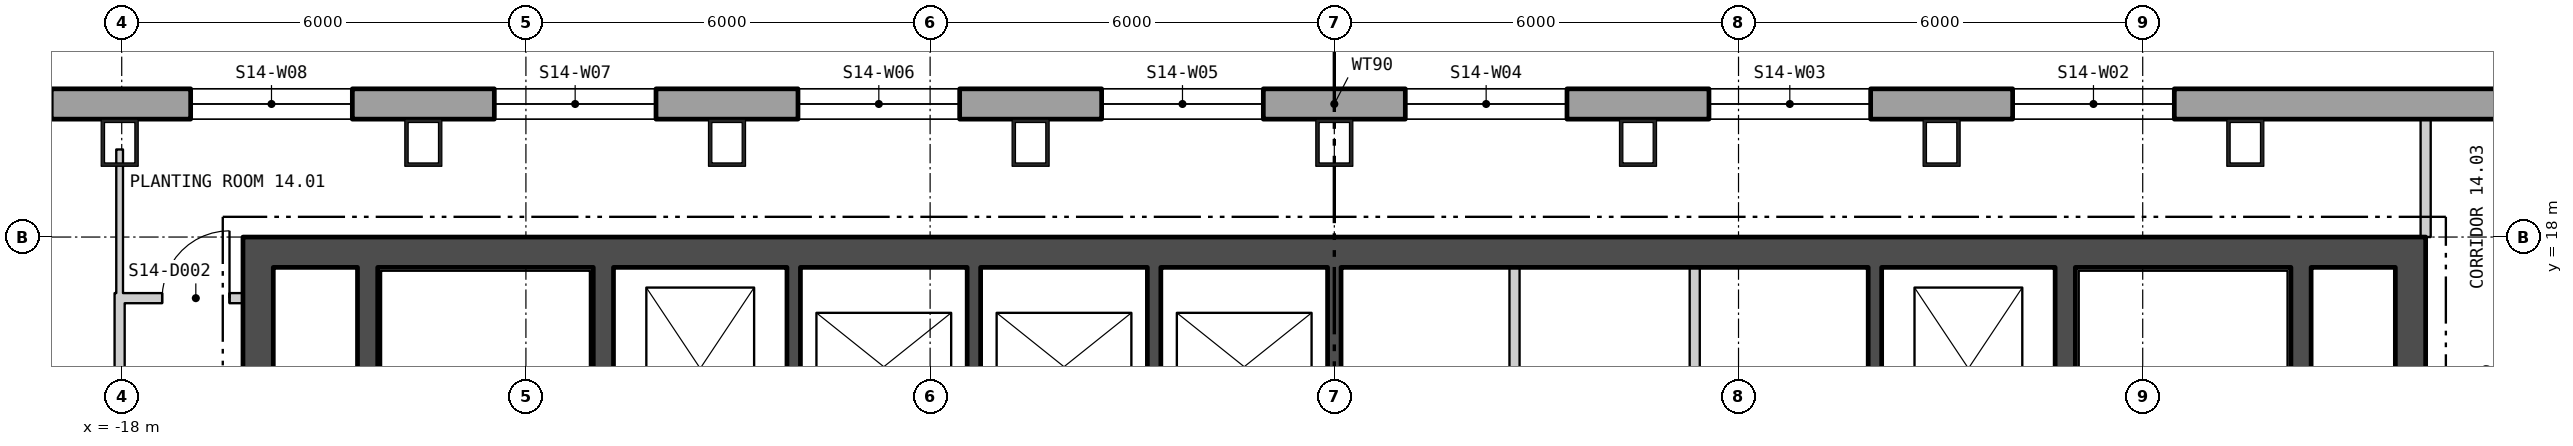
"""IFC4 building model, lengths in metres.
Left out: names, types, materials, properties, quantities, classifications, styles, units other than length and angle.
Written with IfcOpenShell. Run it as: python <this file> out.ifc"""

import sys

from ifc_helpers import new_model, si_unit, direction, frame, frame_2d, origin, origin_2d, place, context, subcontext, project, spatial, polyline, rectangle, hollow_rectangle, outline, extrude, element, fill, save


model = new_model("IFC4")
c1 = context("Model", 3, precision=1e-05, world=origin(), true_north=direction((0.0, 1.0)))
c2 = subcontext(c1, "Body", "Model", "MODEL_VIEW")
j1 = project(units=[si_unit("LENGTHUNIT", "METRE"), si_unit("PLANEANGLEUNIT", "RADIAN")], contexts=[c1])
p1 = place(None, origin())
s1 = spatial("IfcSite", under=j1, at=p1, CompositionType="ELEMENT")
p2 = place(p1, origin())
s2 = spatial("IfcBuilding", under=s1, at=p2, CompositionType="ELEMENT")
p3 = place(p2, frame((0.0, 0.0, 192.6)))
s3 = spatial("IfcBuildingStorey", under=s2, at=p3, CompositionType="ELEMENT", Elevation=192.6)
for number, where, z_axis, x_axis in (
    (1, (13.523, 19.4, 0.0), (0.0, 0.0, 1.0), (-1.0, 0.0, 0.0)),
    (2, (9.015, 19.4, 0.0), (0.0, 0.0, 1.0), (-1.0, 0.0, 0.0)),
    (3, (4.508, 19.4, 0.0), (0.0, 0.0, 1.0), (-1.0, 0.0, 0.0)),
    (4, (0.0, 19.4, 0.0), (0.0, 0.0, 1.0), (-1.0, 0.0, 0.0)),
    (5, (-4.508, 19.4, 0.0), (0.0, 0.0, 1.0), (-1.0, 0.0, 0.0)),
    (6, (-9.015, 19.4, 0.0), (0.0, 0.0, 1.0), (-1.0, 0.0, 0.0)),
    (7, (-13.523, 19.4, 0.0), (0.0, 0.0, 1.0), (-1.0, 0.0, 0.0)),
    (8, (-18.03, 19.4, 0.0), (0.0, 0.0, 1.0), (-1.0, 0.0, 0.0)),
):
    element("IfcColumn", number, at=place(p3, frame(where, z_axis=z_axis, x_axis=x_axis)), inside=s3, PredefinedType="COLUMN", context=c2, shape_type="SweptSolid", body=[
        extrude(hollow_rectangle(XDim=0.55, YDim=0.7, WallThickness=0.05, at=origin_2d()), origin(), (0.0, 0.0, 1.0), 3.9),
    ])
p4 = place(p3, frame((22.87, 19.975, -0.4), z_axis=(0.0, 0.0, 1.0), x_axis=(-1.0, 0.0, 0.0)))
e9 = element("IfcWall", 9, at=p4, inside=s3, PredefinedType="SOLIDWALL", context=c2, shape_type="SweptSolid", body=[
    extrude(outline(polyline([(-0.13, -0.225), (45.87, -0.225), (45.61, 0.225), (0.13, 0.225), (-0.13, -0.225)])), origin(), (0.0, 0.0, 1.0), 3.9),
])
p5 = place(p4, frame((1.424, 0.0, 1.3)))
e10 = element("IfcOpeningElement", 10, at=p5, cuts=e9, PredefinedType="OPENING", context=c2, shape_type="SweptSolid", body=[
    extrude(rectangle(XDim=2.4, YDim=2.0, at=frame_2d((1.2, 1.0))), frame((0.0, 0.235, 0.0), z_axis=(0.0, -1.0, 0.0), x_axis=(1.0, 0.0, 0.0)), (0.0, 0.0, 1.0), 0.47),
])
p6 = place(p4, frame((10.401, 0.0, 1.3)))
e11 = element("IfcOpeningElement", 11, at=p6, cuts=e9, PredefinedType="OPENING", context=c2, shape_type="SweptSolid", body=[
    extrude(rectangle(XDim=2.4, YDim=2.0, at=frame_2d((1.2, 1.0))), frame((0.0, 0.235, 0.0), z_axis=(0.0, -1.0, 0.0), x_axis=(1.0, 0.0, 0.0)), (0.0, 0.0, 1.0), 0.47),
])
p7 = place(p4, frame((14.909, 0.0, 1.3)))
e12 = element("IfcOpeningElement", 12, at=p7, cuts=e9, PredefinedType="OPENING", context=c2, shape_type="SweptSolid", body=[
    extrude(rectangle(XDim=2.4, YDim=2.0, at=frame_2d((1.2, 1.0))), frame((0.0, 0.235, 0.0), z_axis=(0.0, -1.0, 0.0), x_axis=(1.0, 0.0, 0.0)), (0.0, 0.0, 1.0), 0.47),
])
p8 = place(p4, frame((19.416, 0.0, 1.3)))
e13 = element("IfcOpeningElement", 13, at=p8, cuts=e9, PredefinedType="OPENING", context=c2, shape_type="SweptSolid", body=[
    extrude(rectangle(XDim=2.4, YDim=2.0, at=frame_2d((1.2, 1.0))), frame((0.0, 0.235, 0.0), z_axis=(0.0, -1.0, 0.0), x_axis=(1.0, 0.0, 0.0)), (0.0, 0.0, 1.0), 0.47),
])
p9 = place(p4, frame((23.924, 0.0, 1.3)))
e14 = element("IfcOpeningElement", 14, at=p9, cuts=e9, PredefinedType="OPENING", context=c2, shape_type="SweptSolid", body=[
    extrude(rectangle(XDim=2.4, YDim=2.0, at=frame_2d((1.2, 1.0))), frame((0.0, 0.235, 0.0), z_axis=(0.0, -1.0, 0.0), x_axis=(1.0, 0.0, 0.0)), (0.0, 0.0, 1.0), 0.47),
])
p10 = place(p4, frame((28.431, 0.0, 1.3)))
e15 = element("IfcOpeningElement", 15, at=p10, cuts=e9, PredefinedType="OPENING", context=c2, shape_type="SweptSolid", body=[
    extrude(rectangle(XDim=2.4, YDim=2.0, at=frame_2d((1.2, 1.0))), frame((0.0, 0.235, 0.0), z_axis=(0.0, -1.0, 0.0), x_axis=(1.0, 0.0, 0.0)), (0.0, 0.0, 1.0), 0.47),
])
p11 = place(p4, frame((32.939, 0.0, 1.3)))
e16 = element("IfcOpeningElement", 16, at=p11, cuts=e9, PredefinedType="OPENING", context=c2, shape_type="SweptSolid", body=[
    extrude(rectangle(XDim=2.4, YDim=2.0, at=frame_2d((1.2, 1.0))), frame((0.0, 0.235, 0.0), z_axis=(0.0, -1.0, 0.0), x_axis=(1.0, 0.0, 0.0)), (0.0, 0.0, 1.0), 0.47),
])
p12 = place(p4, frame((37.447, 0.0, 1.3)))
e17 = element("IfcOpeningElement", 17, at=p12, cuts=e9, PredefinedType="OPENING", context=c2, shape_type="SweptSolid", body=[
    extrude(rectangle(XDim=2.4, YDim=2.0, at=frame_2d((1.2, 1.0))), frame((0.0, 0.235, 0.0), z_axis=(0.0, -1.0, 0.0), x_axis=(1.0, 0.0, 0.0)), (0.0, 0.0, 1.0), 0.47),
])
p13 = place(p4, frame((41.916, 0.0, 1.3)))
e18 = element("IfcOpeningElement", 18, at=p13, cuts=e9, PredefinedType="OPENING", context=c2, shape_type="SweptSolid", body=[
    extrude(rectangle(XDim=2.4, YDim=2.0, at=frame_2d((1.2, 1.0))), frame((0.0, 0.235, 0.0), z_axis=(0.0, -1.0, 0.0), x_axis=(1.0, 0.0, 0.0)), (0.0, 0.0, 1.0), 0.47),
])
p14 = place(p3, frame((-16.2, 17.775, 0.0), z_axis=(0.0, 0.0, 1.0), x_axis=(1.0, 0.0, 0.0)))
e19 = element("IfcWall", 19, at=p14, inside=s3, PredefinedType="SHEAR", context=c2, shape_type="SweptSolid", body=[
    extrude(rectangle(XDim=32.4, YDim=0.45, at=frame_2d((16.2, 0.0))), origin(), (0.0, 0.0, 1.0), 3.7),
])
p15 = place(p3, frame((-15.975, 2.45, 0.0), z_axis=(0.0, 0.0, 1.0), x_axis=(0.0, 1.0, 0.0)))
e20 = element("IfcWall", 20, at=p15, inside=s3, PredefinedType="SHEAR", context=c2, shape_type="SweptSolid", body=[
    extrude(rectangle(XDim=15.1, YDim=0.45, at=frame_2d((7.55, 0.0))), origin(), (0.0, 0.0, 1.0), 3.7),
])
p16 = place(p15, frame((4.4, 0.0, 0.0)))
e21 = element("IfcOpeningElement", 21, at=p16, cuts=e20, PredefinedType="OPENING", context=c2, shape_type="SweptSolid", body=[
    extrude(rectangle(XDim=1.5, YDim=2.1, at=frame_2d((0.75, 1.05))), frame((0.0, 0.235, 0.0), z_axis=(0.0, -1.0, 0.0), x_axis=(1.0, 0.0, 0.0)), (0.0, 0.0, 1.0), 0.47),
])
p17 = place(p15, frame((0.4, 0.0, 0.0)))
e22 = element("IfcOpeningElement", 22, at=p17, cuts=e20, PredefinedType="OPENING", context=c2, shape_type="SweptSolid", body=[
    extrude(rectangle(XDim=1.0, YDim=2.1, at=frame_2d((0.5, 1.05))), frame((0.0, 0.235, 0.0), z_axis=(0.0, -1.0, 0.0), x_axis=(1.0, 0.0, 0.0)), (0.0, 0.0, 1.0), 0.47),
])
p18 = place(p15, frame((2.5, 0.0, 0.0)))
e23 = element("IfcOpeningElement", 23, at=p18, cuts=e20, PredefinedType="OPENING", context=c2, shape_type="SweptSolid", body=[
    extrude(rectangle(XDim=0.9, YDim=2.1, at=frame_2d((0.45, 1.05))), frame((0.0, 0.235, 0.0), z_axis=(0.0, -1.0, 0.0), x_axis=(1.0, 0.0, 0.0)), (0.0, 0.0, 1.0), 0.47),
])
p19 = place(p15, frame((6.544, 0.0, 0.0)))
e24 = element("IfcOpeningElement", 24, at=p19, cuts=e20, PredefinedType="OPENING", context=c2, shape_type="SweptSolid", body=[
    extrude(rectangle(XDim=0.9, YDim=2.1, at=frame_2d((0.45, 1.05))), frame((0.0, 0.235, 0.0), z_axis=(0.0, -1.0, 0.0), x_axis=(1.0, 0.0, 0.0)), (0.0, 0.0, 1.0), 0.47),
])
p20 = place(p15, frame((11.144, 0.0, 0.0)))
e25 = element("IfcOpeningElement", 25, at=p20, cuts=e20, PredefinedType="OPENING", context=c2, shape_type="SweptSolid", body=[
    extrude(rectangle(XDim=0.9, YDim=2.1, at=frame_2d((0.45, 1.05))), frame((0.0, 0.235, 0.0), z_axis=(0.0, -1.0, 0.0), x_axis=(1.0, 0.0, 0.0)), (0.0, 0.0, 1.0), 0.47),
])
p21 = place(p3, frame((15.975, 2.45, 0.0), z_axis=(0.0, 0.0, 1.0), x_axis=(0.0, 1.0, 0.0)))
e26 = element("IfcWall", 26, at=p21, inside=s3, PredefinedType="SHEAR", context=c2, shape_type="SweptSolid", body=[
    extrude(rectangle(XDim=15.1, YDim=0.45, at=frame_2d((7.55, 0.0))), origin(), (0.0, 0.0, 1.0), 3.7),
])
p22 = place(p21, frame((4.4, 0.0, 0.0)))
e27 = element("IfcOpeningElement", 27, at=p22, cuts=e26, PredefinedType="OPENING", context=c2, shape_type="SweptSolid", body=[
    extrude(rectangle(XDim=1.5, YDim=2.1, at=frame_2d((0.75, 1.05))), frame((0.0, 0.235, 0.0), z_axis=(0.0, -1.0, 0.0), x_axis=(1.0, 0.0, 0.0)), (0.0, 0.0, 1.0), 0.47),
])
p23 = place(p21, frame((0.85, 0.0, 0.0)))
e28 = element("IfcOpeningElement", 28, at=p23, cuts=e26, PredefinedType="OPENING", context=c2, shape_type="SweptSolid", body=[
    extrude(rectangle(XDim=0.9, YDim=2.1, at=frame_2d((0.45, 1.05))), frame((0.0, 0.235, 0.0), z_axis=(0.0, -1.0, 0.0), x_axis=(1.0, 0.0, 0.0)), (0.0, 0.0, 1.0), 0.47),
])
p24 = place(p21, frame((3.0, 0.0, 0.0)))
e29 = element("IfcOpeningElement", 29, at=p24, cuts=e26, PredefinedType="OPENING", context=c2, shape_type="SweptSolid", body=[
    extrude(rectangle(XDim=1.0, YDim=2.1, at=frame_2d((0.5, 1.05))), frame((0.0, 0.235, 0.0), z_axis=(0.0, -1.0, 0.0), x_axis=(1.0, 0.0, 0.0)), (0.0, 0.0, 1.0), 0.47),
])
p25 = place(p21, frame((7.239, 0.0, 0.0)))
e30 = element("IfcOpeningElement", 30, at=p25, cuts=e26, PredefinedType="OPENING", context=c2, shape_type="SweptSolid", body=[
    extrude(rectangle(XDim=0.9, YDim=2.1, at=frame_2d((0.45, 1.05))), frame((0.0, 0.235, 0.0), z_axis=(0.0, -1.0, 0.0), x_axis=(1.0, 0.0, 0.0)), (0.0, 0.0, 1.0), 0.47),
])
p26 = place(p21, frame((11.839, 0.0, 0.0)))
e31 = element("IfcOpeningElement", 31, at=p26, cuts=e26, PredefinedType="OPENING", context=c2, shape_type="SweptSolid", body=[
    extrude(rectangle(XDim=0.9, YDim=2.1, at=frame_2d((0.45, 1.05))), frame((0.0, 0.235, 0.0), z_axis=(0.0, -1.0, 0.0), x_axis=(1.0, 0.0, 0.0)), (0.0, 0.0, 1.0), 0.47),
])
p27 = place(p3, frame((-10.85, 2.45, 0.0), z_axis=(0.0, 0.0, 1.0), x_axis=(0.0, 1.0, 0.0)))
e32 = element("IfcWall", 32, at=p27, inside=s3, PredefinedType="SHEAR", context=c2, shape_type="SweptSolid", body=[
    extrude(rectangle(XDim=15.1, YDim=0.3, at=frame_2d((7.55, 0.0))), origin(), (0.0, 0.0, 1.0), 3.7),
])
p28 = place(p27, frame((3.525, 0.0, 0.0)))
e33 = element("IfcOpeningElement", 33, at=p28, cuts=e32, PredefinedType="OPENING", context=c2, shape_type="SweptSolid", body=[
    extrude(rectangle(XDim=1.25, YDim=2.1, at=frame_2d((0.625, 1.05))), frame((0.0, 0.16, 0.0), z_axis=(0.0, -1.0, 0.0), x_axis=(1.0, 0.0, 0.0)), (0.0, 0.0, 1.0), 0.32),
])
p29 = place(p27, frame((1.15, 0.0, 0.0)))
e34 = element("IfcOpeningElement", 34, at=p29, cuts=e32, PredefinedType="OPENING", context=c2, shape_type="SweptSolid", body=[
    extrude(rectangle(XDim=1.0, YDim=2.1, at=frame_2d((0.5, 1.05))), frame((0.0, 0.16, 0.0), z_axis=(0.0, -1.0, 0.0), x_axis=(1.0, 0.0, 0.0)), (0.0, 0.0, 1.0), 0.32),
])
p30 = place(p3, frame((-14.35, 2.45, 0.0), z_axis=(0.0, 0.0, 1.0), x_axis=(0.0, 1.0, 0.0)))
e35 = element("IfcWall", 35, at=p30, inside=s3, PredefinedType="SHEAR", context=c2, shape_type="SweptSolid", body=[
    extrude(rectangle(XDim=15.1, YDim=0.3, at=frame_2d((7.55, 0.0))), origin(), (0.0, 0.0, 1.0), 3.7),
])
p31 = place(p30, frame((4.4, 0.0, 0.0)))
e36 = element("IfcOpeningElement", 36, at=p31, cuts=e35, PredefinedType="OPENING", context=c2, shape_type="SweptSolid", body=[
    extrude(rectangle(XDim=1.5, YDim=2.1, at=frame_2d((0.75, 1.05))), frame((0.0, 0.16, 0.0), z_axis=(0.0, -1.0, 0.0), x_axis=(1.0, 0.0, 0.0)), (0.0, 0.0, 1.0), 0.32),
])
p32 = place(p3, frame((10.85, 2.45, 0.0), z_axis=(0.0, 0.0, 1.0), x_axis=(0.0, 1.0, 0.0)))
e37 = element("IfcWall", 37, at=p32, inside=s3, PredefinedType="SHEAR", context=c2, shape_type="SweptSolid", body=[
    extrude(rectangle(XDim=15.1, YDim=0.3, at=frame_2d((7.55, 0.0))), origin(), (0.0, 0.0, 1.0), 3.7),
])
p33 = place(p32, frame((3.525, 0.0, 0.0)))
e38 = element("IfcOpeningElement", 38, at=p33, cuts=e37, PredefinedType="OPENING", context=c2, shape_type="SweptSolid", body=[
    extrude(rectangle(XDim=1.25, YDim=2.1, at=frame_2d((0.625, 1.05))), frame((0.0, 0.16, 0.0), z_axis=(0.0, -1.0, 0.0), x_axis=(1.0, 0.0, 0.0)), (0.0, 0.0, 1.0), 0.32),
])
p34 = place(p32, frame((1.15, 0.0, 0.0)))
e39 = element("IfcOpeningElement", 39, at=p34, cuts=e37, PredefinedType="OPENING", context=c2, shape_type="SweptSolid", body=[
    extrude(rectangle(XDim=1.0, YDim=2.1, at=frame_2d((0.5, 1.05))), frame((0.0, 0.16, 0.0), z_axis=(0.0, -1.0, 0.0), x_axis=(1.0, 0.0, 0.0)), (0.0, 0.0, 1.0), 0.32),
])
p35 = place(p3, frame((14.35, 2.45, 0.0), z_axis=(0.0, 0.0, 1.0), x_axis=(0.0, 1.0, 0.0)))
e40 = element("IfcWall", 40, at=p35, inside=s3, PredefinedType="SHEAR", context=c2, shape_type="SweptSolid", body=[
    extrude(rectangle(XDim=15.1, YDim=0.3, at=frame_2d((7.55, 0.0))), origin(), (0.0, 0.0, 1.0), 3.7),
])
p36 = place(p35, frame((4.4, 0.0, 0.0)))
e41 = element("IfcOpeningElement", 41, at=p36, cuts=e40, PredefinedType="OPENING", context=c2, shape_type="SweptSolid", body=[
    extrude(rectangle(XDim=1.5, YDim=2.1, at=frame_2d((0.75, 1.05))), frame((0.0, 0.16, 0.0), z_axis=(0.0, -1.0, 0.0), x_axis=(1.0, 0.0, 0.0)), (0.0, 0.0, 1.0), 0.32),
])
for number, where, z_axis, x_axis in (
    (42, (-8.025, 14.7, 0.0), (0.0, 0.0, 1.0), (0.0, 1.0, 0.0)),
    (43, (-5.35, 14.7, 0.0), (0.0, 0.0, 1.0), (0.0, 1.0, 0.0)),
    (44, (-2.675, 14.7, 0.0), (0.0, 0.0, 1.0), (0.0, 1.0, 0.0)),
    (45, (0.0, 14.7, 0.0), (0.0, 0.0, 1.0), (0.0, 1.0, 0.0)),
):
    element("IfcWall", number, at=place(p3, frame(where, z_axis=z_axis, x_axis=x_axis)), inside=s3, PredefinedType="SHEAR", context=c2, shape_type="SweptSolid", body=[
        extrude(rectangle(XDim=2.85, YDim=0.2, at=frame_2d((1.425, 0.0))), origin(), (0.0, 0.0, 1.0), 3.7),
    ])
for number, where, z_axis, x_axis in (
    (46, (2.675, 14.7, 0.0), (0.0, 0.0, 1.0), (0.0, 1.0, 0.0)),
    (47, (5.35, 14.7, 0.0), (0.0, 0.0, 1.0), (0.0, 1.0, 0.0)),
):
    element("IfcWall", number, at=place(p3, frame(where, z_axis=z_axis, x_axis=x_axis)), inside=s3, PredefinedType="PARTITIONING", context=c2, shape_type="SweptSolid", body=[
        extrude(rectangle(XDim=2.85, YDim=0.15, at=frame_2d((1.425, 0.0))), origin(), (0.0, 0.0, 1.0), 3.7),
    ])
p37 = place(p3, frame((8.025, 14.7, 0.0), z_axis=(0.0, 0.0, 1.0), x_axis=(0.0, 1.0, 0.0)))
e48 = element("IfcWall", 48, at=p37, inside=s3, PredefinedType="SHEAR", context=c2, shape_type="SweptSolid", body=[
    extrude(rectangle(XDim=2.85, YDim=0.2, at=frame_2d((1.425, 0.0))), origin(), (0.0, 0.0, 1.0), 3.7),
])
p38 = place(p3, frame((-18.031, 12.943, 0.0), z_axis=(0.0, 0.0, 1.0), x_axis=(0.0, 1.0, 0.0)))
e49 = element("IfcWall", 49, at=p38, inside=s3, PredefinedType="PARTITIONING", context=c2, shape_type="SweptSolid", body=[
    extrude(rectangle(XDim=4.225, YDim=0.15, at=frame_2d((2.112, 0.0))), origin(), (0.0, 0.0, 1.0), 3.7),
])
p39 = place(p38, frame((1.556, 0.0, 0.0)))
e50 = element("IfcOpeningElement", 50, at=p39, cuts=e49, PredefinedType="OPENING", context=c2, shape_type="SweptSolid", body=[
    extrude(rectangle(XDim=1.0, YDim=2.1, at=frame_2d((0.5, 1.05))), frame((0.0, 0.085, 0.0), z_axis=(0.0, -1.0, 0.0), x_axis=(1.0, 0.0, 0.0)), (0.0, 0.0, 1.0), 0.17),
])
p40 = place(p3, frame((-18.031, 17.168, 0.0), z_axis=(0.0, 0.0, 1.0), x_axis=(0.0, 1.0, 0.0)))
e51 = element("IfcWall", 51, at=p40, inside=s3, PredefinedType="PARTITIONING", context=c2, shape_type="SweptSolid", body=[
    extrude(rectangle(XDim=2.132, YDim=0.1, at=frame_2d((1.066, 0.0))), origin(), (0.0, 0.0, 1.0), 3.7),
])
p41 = place(p3, frame((-17.956, 17.093, 0.0), z_axis=(0.0, 0.0, 1.0), x_axis=(1.0, 0.0, 0.0)))
e52 = element("IfcWall", 52, at=p41, inside=s3, PredefinedType="PARTITIONING", context=c2, shape_type="SweptSolid", body=[
    extrude(rectangle(XDim=1.756, YDim=0.15, at=frame_2d((0.878, 0.0))), origin(), (0.0, 0.0, 1.0), 3.7),
])
p42 = place(p41, frame((0.556, 0.0, 0.0)))
e53 = element("IfcOpeningElement", 53, at=p42, cuts=e52, PredefinedType="OPENING", context=c2, shape_type="SweptSolid", body=[
    extrude(rectangle(XDim=1.0, YDim=2.1, at=frame_2d((0.5, 1.05))), frame((0.0, 0.085, 0.0), z_axis=(0.0, -1.0, 0.0), x_axis=(1.0, 0.0, 0.0)), (0.0, 0.0, 1.0), 0.17),
])
p43 = place(p3, frame((16.2, 18.0, 0.0), z_axis=(0.0, 0.0, 1.0), x_axis=(0.0, 1.0, 0.0)))
e54 = element("IfcWall", 54, at=p43, inside=s3, PredefinedType="PARTITIONING", context=c2, shape_type="SweptSolid", body=[
    extrude(rectangle(XDim=1.75, YDim=0.15, at=frame_2d((0.875, 0.0))), origin(), (0.0, 0.0, 1.0), 3.7),
])
p44 = place(p6, origin())
e55 = element("IfcWindow", 55, at=p44, inside=s3, PartitioningType="SINGLE_PANEL", PredefinedType="WINDOW", context=c2, shape_type="SweptSolid", body=[
    extrude(rectangle(XDim=2.4, YDim=2.0, at=frame_2d((1.2, 1.0))), frame((0.0, 0.105, 0.0), z_axis=(0.0, -1.0, 0.0), x_axis=(1.0, 0.0, 0.0)), (0.0, 0.0, 1.0), 0.06),
])
fill(e11, e55)
p45 = place(p7, origin())
e56 = element("IfcWindow", 56, at=p45, inside=s3, PartitioningType="SINGLE_PANEL", PredefinedType="WINDOW", context=c2, shape_type="SweptSolid", body=[
    extrude(rectangle(XDim=2.4, YDim=2.0, at=frame_2d((1.2, 1.0))), frame((0.0, 0.105, 0.0), z_axis=(0.0, -1.0, 0.0), x_axis=(1.0, 0.0, 0.0)), (0.0, 0.0, 1.0), 0.06),
])
fill(e12, e56)
p46 = place(p8, origin())
e57 = element("IfcWindow", 57, at=p46, inside=s3, PartitioningType="SINGLE_PANEL", PredefinedType="WINDOW", context=c2, shape_type="SweptSolid", body=[
    extrude(rectangle(XDim=2.4, YDim=2.0, at=frame_2d((1.2, 1.0))), frame((0.0, 0.105, 0.0), z_axis=(0.0, -1.0, 0.0), x_axis=(1.0, 0.0, 0.0)), (0.0, 0.0, 1.0), 0.06),
])
fill(e13, e57)
p47 = place(p9, origin())
e58 = element("IfcWindow", 58, at=p47, inside=s3, PartitioningType="SINGLE_PANEL", PredefinedType="WINDOW", context=c2, shape_type="SweptSolid", body=[
    extrude(rectangle(XDim=2.4, YDim=2.0, at=frame_2d((1.2, 1.0))), frame((0.0, 0.105, 0.0), z_axis=(0.0, -1.0, 0.0), x_axis=(1.0, 0.0, 0.0)), (0.0, 0.0, 1.0), 0.06),
])
fill(e14, e58)
p48 = place(p10, origin())
e59 = element("IfcWindow", 59, at=p48, inside=s3, PartitioningType="SINGLE_PANEL", PredefinedType="WINDOW", context=c2, shape_type="SweptSolid", body=[
    extrude(rectangle(XDim=2.4, YDim=2.0, at=frame_2d((1.2, 1.0))), frame((0.0, 0.105, 0.0), z_axis=(0.0, -1.0, 0.0), x_axis=(1.0, 0.0, 0.0)), (0.0, 0.0, 1.0), 0.06),
])
fill(e15, e59)
p49 = place(p11, origin())
e60 = element("IfcWindow", 60, at=p49, inside=s3, PartitioningType="SINGLE_PANEL", PredefinedType="WINDOW", context=c2, shape_type="SweptSolid", body=[
    extrude(rectangle(XDim=2.4, YDim=2.0, at=frame_2d((1.2, 1.0))), frame((0.0, 0.105, 0.0), z_axis=(0.0, -1.0, 0.0), x_axis=(1.0, 0.0, 0.0)), (0.0, 0.0, 1.0), 0.06),
])
fill(e16, e60)
p50 = place(p12, origin())
e61 = element("IfcWindow", 61, at=p50, inside=s3, PartitioningType="SINGLE_PANEL", PredefinedType="WINDOW", context=c2, shape_type="SweptSolid", body=[
    extrude(rectangle(XDim=2.4, YDim=2.0, at=frame_2d((1.2, 1.0))), frame((0.0, 0.105, 0.0), z_axis=(0.0, -1.0, 0.0), x_axis=(1.0, 0.0, 0.0)), (0.0, 0.0, 1.0), 0.06),
])
fill(e17, e61)
p51 = place(p42, origin())
e62 = element("IfcDoor", 62, at=p51, inside=s3, OperationType="SINGLE_SWING_LEFT", PredefinedType="DOOR", context=c2, shape_type="SweptSolid", body=[
    extrude(rectangle(XDim=1.0, YDim=2.1, at=frame_2d((0.5, 1.05))), frame((0.0, 0.025, 0.0), z_axis=(0.0, -1.0, 0.0), x_axis=(1.0, 0.0, 0.0)), (0.0, 0.0, 1.0), 0.05),
])
fill(e53, e62)
save(model, sys.argv[1])
